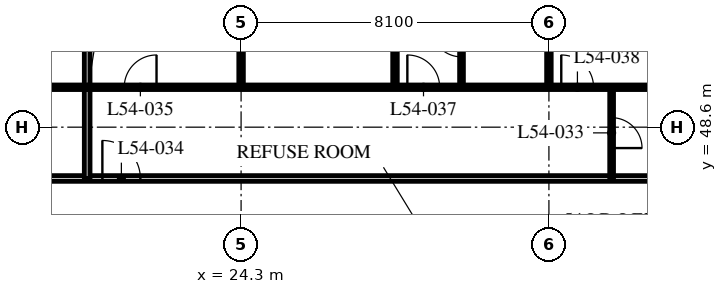
"""IFC4 building model, lengths in metres.
Left out: names, types, materials, properties, quantities, classifications, styles, units other than length and angle.
Written with IfcOpenShell. Run it as: python <this file> out.ifc"""

import sys

from ifc_helpers import new_model, si_unit, direction, frame, frame_2d, origin, place, context, subcontext, project, spatial, rectangle, extrude, element, fill, save


model = new_model("IFC4")
c1 = context("Model", 3, precision=1e-05, world=origin(), true_north=direction((0.0, 1.0)))
c2 = subcontext(c1, "Body", "Model", "MODEL_VIEW")
j1 = project(units=[si_unit("LENGTHUNIT", "METRE"), si_unit("PLANEANGLEUNIT", "RADIAN")], contexts=[c1])
p1 = place(None, origin())
s1 = spatial("IfcSite", under=j1, at=p1, CompositionType="ELEMENT")
p2 = place(p1, origin())
s2 = spatial("IfcBuilding", under=s1, at=p2, CompositionType="ELEMENT")
p3 = place(p2, frame((0.0, 0.0, 210.0)))
s3 = spatial("IfcBuildingStorey", under=s2, at=p3, CompositionType="ELEMENT", Elevation=210.0)
p4 = place(p3, frame((8.1, 47.25, 0.0), z_axis=(0.0, 0.0, 1.0), x_axis=(1.0, 0.0, 0.0)))
e1 = element("IfcWall", 1, at=p4, inside=s3, PredefinedType="PARTITIONING", context=c2, shape_type="SweptSolid", body=[
    extrude(rectangle(XDim=36.45, YDim=0.15, at=frame_2d((18.225, 0.0))), origin(), (0.0, 0.0, 1.0), 3.39),
])
p5 = place(p4, frame((4.45, 0.0, 0.0)))
e2 = element("IfcOpeningElement", 2, at=p5, cuts=e1, PredefinedType="OPENING", context=c2, shape_type="SweptSolid", body=[
    extrude(rectangle(XDim=1.0, YDim=2.1, at=frame_2d((0.5, 1.05))), frame((0.0, 0.085, 0.0), z_axis=(0.0, -1.0, 0.0), x_axis=(1.0, 0.0, 0.0)), (0.0, 0.0, 1.0), 0.17),
])
p6 = place(p4, frame((12.55, 0.0, 0.0)))
e3 = element("IfcOpeningElement", 3, at=p6, cuts=e1, PredefinedType="OPENING", context=c2, shape_type="SweptSolid", body=[
    extrude(rectangle(XDim=1.0, YDim=2.1, at=frame_2d((0.5, 1.05))), frame((0.0, 0.085, 0.0), z_axis=(0.0, -1.0, 0.0), x_axis=(1.0, 0.0, 0.0)), (0.0, 0.0, 1.0), 0.17),
])
p7 = place(p4, frame((30.7, 0.0, 0.0)))
e4 = element("IfcOpeningElement", 4, at=p7, cuts=e1, PredefinedType="OPENING", context=c2, shape_type="SweptSolid", body=[
    extrude(rectangle(XDim=1.0, YDim=2.1, at=frame_2d((0.5, 1.05))), frame((0.0, 0.085, 0.0), z_axis=(0.0, -1.0, 0.0), x_axis=(1.0, 0.0, 0.0)), (0.0, 0.0, 1.0), 0.17),
])
p8 = place(p4, frame((33.925, 0.0, 0.0)))
e5 = element("IfcOpeningElement", 5, at=p8, cuts=e1, PredefinedType="OPENING", context=c2, shape_type="SweptSolid", body=[
    extrude(rectangle(XDim=1.0, YDim=2.1, at=frame_2d((0.5, 1.05))), frame((0.0, 0.085, 0.0), z_axis=(0.0, -1.0, 0.0), x_axis=(1.0, 0.0, 0.0)), (0.0, 0.0, 1.0), 0.17),
])
p9 = place(p4, frame((1.525, 0.0, 0.0)))
e6 = element("IfcOpeningElement", 6, at=p9, cuts=e1, PredefinedType="OPENING", context=c2, shape_type="SweptSolid", body=[
    extrude(rectangle(XDim=1.0, YDim=2.1, at=frame_2d((0.5, 1.05))), frame((0.0, 0.085, 0.0), z_axis=(0.0, -1.0, 0.0), x_axis=(1.0, 0.0, 0.0)), (0.0, 0.0, 1.0), 0.17),
])
p10 = place(p3, frame((20.25, 47.25, 0.0), z_axis=(0.0, 0.0, 1.0), x_axis=(0.0, 1.0, 0.0)))
e7 = element("IfcWall", 7, at=p10, inside=s3, PredefinedType="PARTITIONING", context=c2, shape_type="SweptSolid", body=[
    extrude(rectangle(XDim=11.85, YDim=0.15, at=frame_2d((5.925, 0.0))), origin(), (0.0, 0.0, 1.0), 3.39),
])
p11 = place(p3, frame((34.05, 47.25, 0.0), z_axis=(0.0, 0.0, 1.0), x_axis=(0.0, 1.0, 0.0)))
e8 = element("IfcWall", 8, at=p11, inside=s3, PredefinedType="PARTITIONING", context=c2, shape_type="SweptSolid", body=[
    extrude(rectangle(XDim=2.4, YDim=0.1, at=frame_2d((1.2, 0.0))), origin(), (0.0, 0.0, 1.0), 3.39),
])
p12 = place(p11, frame((0.8, 0.0, 0.0)))
e9 = element("IfcOpeningElement", 9, at=p12, cuts=e8, PredefinedType="OPENING", context=c2, shape_type="SweptSolid", body=[
    extrude(rectangle(XDim=0.8, YDim=2.1, at=frame_2d((0.4, 1.05))), frame((0.0, 0.06, 0.0), z_axis=(0.0, -1.0, 0.0), x_axis=(1.0, 0.0, 0.0)), (0.0, 0.0, 1.0), 0.12),
])
p13 = place(p3, frame((30.1, 49.65, 0.0), z_axis=(0.0, 0.0, 1.0), x_axis=(0.0, 1.0, 0.0)))
e10 = element("IfcWall", 10, at=p13, inside=s3, PredefinedType="PARTITIONING", context=c2, shape_type="SweptSolid", body=[
    extrude(rectangle(XDim=2.4, YDim=0.1, at=frame_2d((1.2, 0.0))), origin(), (0.0, 0.0, 1.0), 3.39),
])
p14 = place(p13, frame((0.8, 0.0, 0.0)))
e11 = element("IfcOpeningElement", 11, at=p14, cuts=e10, PredefinedType="OPENING", context=c2, shape_type="SweptSolid", body=[
    extrude(rectangle(XDim=0.8, YDim=2.1, at=frame_2d((0.4, 1.05))), frame((0.0, 0.06, 0.0), z_axis=(0.0, -1.0, 0.0), x_axis=(1.0, 0.0, 0.0)), (0.0, 0.0, 1.0), 0.12),
])
p15 = place(p3, frame((28.35, 49.65, 0.0), z_axis=(0.0, 0.0, 1.0), x_axis=(0.0, 1.0, 0.0)))
e12 = element("IfcWall", 12, at=p15, inside=s3, PredefinedType="PARTITIONING", context=c2, shape_type="SweptSolid", body=[
    extrude(rectangle(XDim=9.45, YDim=0.12, at=frame_2d((4.725, 0.0))), origin(), (0.0, 0.0, 1.0), 3.39),
])
p16 = place(p3, frame((32.4, 49.65, 0.0), z_axis=(0.0, 0.0, 1.0), x_axis=(0.0, 1.0, 0.0)))
e13 = element("IfcWall", 13, at=p16, inside=s3, PredefinedType="PARTITIONING", context=c2, shape_type="SweptSolid", body=[
    extrude(rectangle(XDim=9.45, YDim=0.12, at=frame_2d((4.725, 0.0))), origin(), (0.0, 0.0, 1.0), 2.778),
])
p17 = place(p3, frame((4.1, 49.65, 0.0), z_axis=(0.0, 0.0, 1.0), x_axis=(1.0, 0.0, 0.0)))
e14 = element("IfcWall", 14, at=p17, inside=s3, PredefinedType="PARTITIONING", context=c2, shape_type="SweptSolid", body=[
    extrude(rectangle(XDim=32.35, YDim=0.12, at=frame_2d((16.175, 0.0))), origin(), (0.0, 0.0, 1.0), 3.39),
])
p18 = place(p17, frame((9.025, 0.0, 0.0)))
e15 = element("IfcOpeningElement", 15, at=p18, cuts=e14, PredefinedType="OPENING", context=c2, shape_type="SweptSolid", body=[
    extrude(rectangle(XDim=0.85, YDim=2.1, at=frame_2d((0.425, 1.05))), frame((0.0, 0.07, 0.0), z_axis=(0.0, -1.0, 0.0), x_axis=(1.0, 0.0, 0.0)), (0.0, 0.0, 1.0), 0.14),
])
p19 = place(p17, frame((12.425, 0.0, 0.0)))
e16 = element("IfcOpeningElement", 16, at=p19, cuts=e14, PredefinedType="OPENING", context=c2, shape_type="SweptSolid", body=[
    extrude(rectangle(XDim=0.85, YDim=2.1, at=frame_2d((0.425, 1.05))), frame((0.0, 0.07, 0.0), z_axis=(0.0, -1.0, 0.0), x_axis=(1.0, 0.0, 0.0)), (0.0, 0.0, 1.0), 0.14),
])
p20 = place(p17, frame((17.125, 0.0, 0.0)))
e17 = element("IfcOpeningElement", 17, at=p20, cuts=e14, PredefinedType="OPENING", context=c2, shape_type="SweptSolid", body=[
    extrude(rectangle(XDim=0.85, YDim=2.1, at=frame_2d((0.425, 1.05))), frame((0.0, 0.07, 0.0), z_axis=(0.0, -1.0, 0.0), x_axis=(1.0, 0.0, 0.0)), (0.0, 0.0, 1.0), 0.14),
])
p21 = place(p17, frame((24.575, 0.0, 0.0)))
e18 = element("IfcOpeningElement", 18, at=p21, cuts=e14, PredefinedType="OPENING", context=c2, shape_type="SweptSolid", body=[
    extrude(rectangle(XDim=0.85, YDim=2.1, at=frame_2d((0.425, 1.05))), frame((0.0, 0.07, 0.0), z_axis=(0.0, -1.0, 0.0), x_axis=(1.0, 0.0, 0.0)), (0.0, 0.0, 1.0), 0.14),
])
p22 = place(p17, frame((28.625, 0.0, 0.0)))
e19 = element("IfcOpeningElement", 19, at=p22, cuts=e14, PredefinedType="OPENING", context=c2, shape_type="SweptSolid", body=[
    extrude(rectangle(XDim=0.85, YDim=2.1, at=frame_2d((0.425, 1.05))), frame((0.0, 0.07, 0.0), z_axis=(0.0, -1.0, 0.0), x_axis=(1.0, 0.0, 0.0)), (0.0, 0.0, 1.0), 0.14),
])
p23 = place(p17, frame((6.725, 0.0, 0.0)))
e20 = element("IfcOpeningElement", 20, at=p23, cuts=e14, PredefinedType="OPENING", context=c2, shape_type="SweptSolid", body=[
    extrude(rectangle(XDim=0.85, YDim=2.1, at=frame_2d((0.425, 1.05))), frame((0.0, 0.07, 0.0), z_axis=(0.0, -1.0, 0.0), x_axis=(1.0, 0.0, 0.0)), (0.0, 0.0, 1.0), 0.14),
])
p24 = place(p17, frame((2.875, 0.0, 0.0)))
e21 = element("IfcOpeningElement", 21, at=p24, cuts=e14, PredefinedType="OPENING", context=c2, shape_type="SweptSolid", body=[
    extrude(rectangle(XDim=0.85, YDim=2.1, at=frame_2d((0.425, 1.05))), frame((0.0, 0.07, 0.0), z_axis=(0.0, -1.0, 0.0), x_axis=(1.0, 0.0, 0.0)), (0.0, 0.0, 1.0), 0.14),
])
p25 = place(p3, frame((24.3, 49.65, 0.0), z_axis=(0.0, 0.0, 1.0), x_axis=(0.0, 1.0, 0.0)))
e22 = element("IfcWall", 22, at=p25, inside=s3, PredefinedType="PARTITIONING", context=c2, shape_type="SweptSolid", body=[
    extrude(rectangle(XDim=1.35, YDim=0.12, at=frame_2d((0.675, 0.0))), origin(), (0.0, 0.0, 1.0), 2.778),
])
p26 = place(p12, origin())
e23 = element("IfcDoor", 23, at=p26, inside=s3, OperationType="SINGLE_SWING_RIGHT", PredefinedType="DOOR", context=c2, shape_type="SweptSolid", body=[
    extrude(rectangle(XDim=0.8, YDim=2.1, at=frame_2d((0.4, 1.05))), frame((0.0, 0.025, 0.0), z_axis=(0.0, -1.0, 0.0), x_axis=(1.0, 0.0, 0.0)), (0.0, 0.0, 1.0), 0.05),
])
fill(e9, e23)
p27 = place(p6, origin())
e24 = element("IfcDoor", 24, at=p27, inside=s3, OperationType="SINGLE_SWING_LEFT", PredefinedType="DOOR", context=c2, shape_type="SweptSolid", body=[
    extrude(rectangle(XDim=1.0, YDim=2.1, at=frame_2d((0.5, 1.05))), frame((0.0, 0.025, 0.0), z_axis=(0.0, -1.0, 0.0), x_axis=(1.0, 0.0, 0.0)), (0.0, 0.0, 1.0), 0.05),
])
fill(e3, e24)
p28 = place(p20, origin())
e25 = element("IfcDoor", 25, at=p28, inside=s3, OperationType="SINGLE_SWING_RIGHT", PredefinedType="DOOR", context=c2, shape_type="SweptSolid", body=[
    extrude(rectangle(XDim=0.85, YDim=2.1, at=frame_2d((0.425, 1.05))), frame((0.0, 0.025, 0.0), z_axis=(0.0, -1.0, 0.0), x_axis=(1.0, 0.0, 0.0)), (0.0, 0.0, 1.0), 0.05),
])
fill(e17, e25)
p29 = place(p14, origin())
e26 = element("IfcDoor", 26, at=p29, inside=s3, OperationType="SINGLE_SWING_RIGHT", PredefinedType="DOOR", context=c2, shape_type="SweptSolid", body=[
    extrude(rectangle(XDim=0.8, YDim=2.1, at=frame_2d((0.4, 1.05))), frame((0.0, 0.025, 0.0), z_axis=(0.0, -1.0, 0.0), x_axis=(1.0, 0.0, 0.0)), (0.0, 0.0, 1.0), 0.05),
])
fill(e11, e26)
p30 = place(p21, origin())
e27 = element("IfcDoor", 27, at=p30, inside=s3, OperationType="SINGLE_SWING_LEFT", PredefinedType="DOOR", context=c2, shape_type="SweptSolid", body=[
    extrude(rectangle(XDim=0.85, YDim=2.1, at=frame_2d((0.425, 1.05))), frame((0.0, 0.025, 0.0), z_axis=(0.0, -1.0, 0.0), x_axis=(1.0, 0.0, 0.0)), (0.0, 0.0, 1.0), 0.05),
])
fill(e18, e27)
p31 = place(p22, origin())
e28 = element("IfcDoor", 28, at=p31, inside=s3, OperationType="SINGLE_SWING_LEFT", PredefinedType="DOOR", context=c2, shape_type="SweptSolid", body=[
    extrude(rectangle(XDim=0.85, YDim=2.1, at=frame_2d((0.425, 1.05))), frame((0.0, 0.025, 0.0), z_axis=(0.0, -1.0, 0.0), x_axis=(1.0, 0.0, 0.0)), (0.0, 0.0, 1.0), 0.05),
])
fill(e19, e28)
save(model, sys.argv[1])
